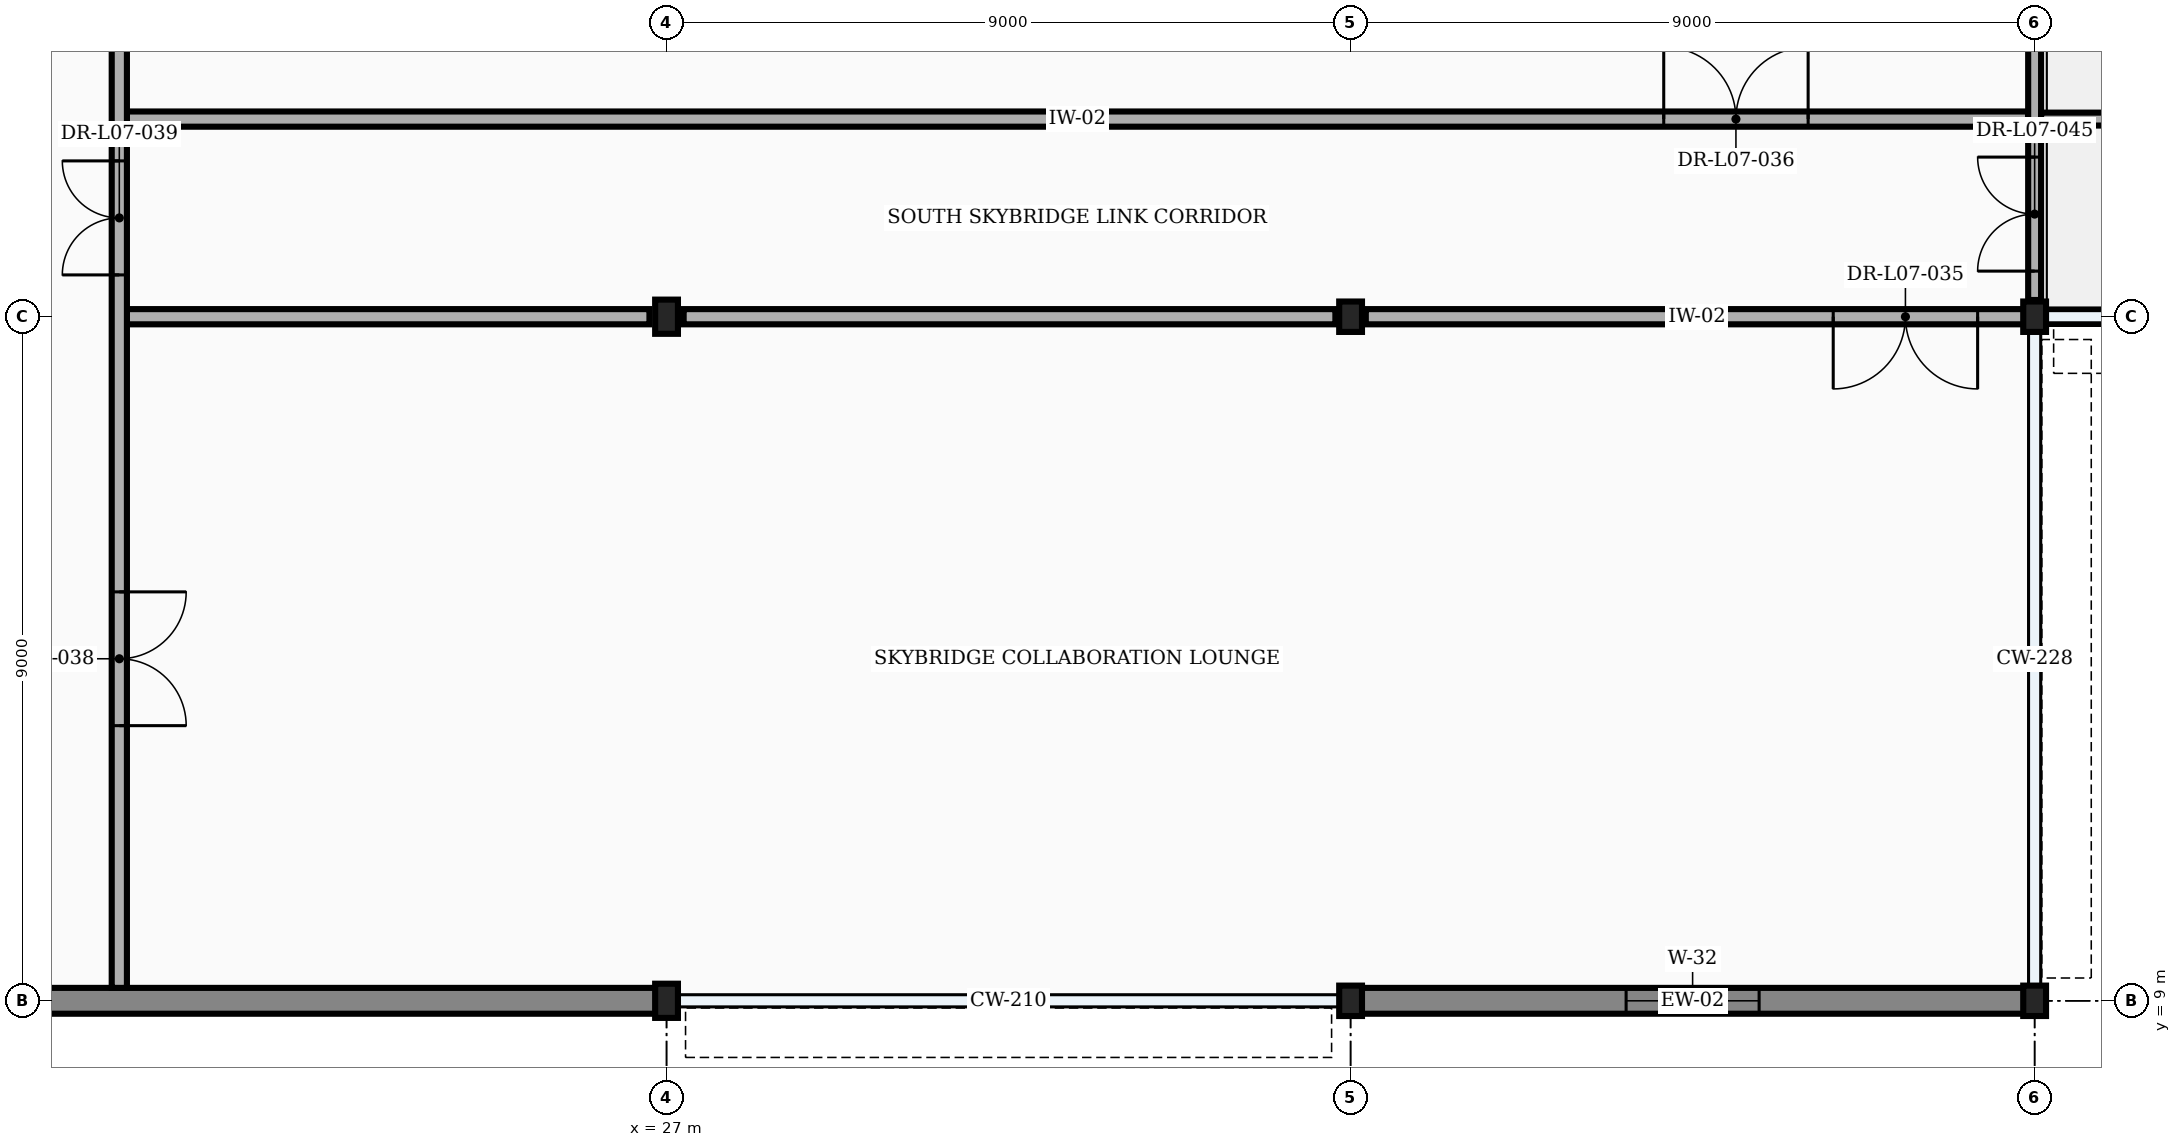
"""IFC4 building model, lengths in metres.
Left out: names, types, materials, properties, quantities, classifications, styles, units other than length and angle.
Written with IfcOpenShell. Run it as: python <this file> out.ifc"""

import sys

from ifc_helpers import new_model, si_unit, direction, frame, frame_2d, origin, origin_2d, place, context, subcontext, project, spatial, rectangle, i_section, extrude, element, fill, save


model = new_model("IFC4")
c1 = context("Model", 3, precision=1e-05, world=origin(), true_north=direction((0.0, 1.0)))
c2 = subcontext(c1, "Body", "Model", "MODEL_VIEW")
j1 = project(units=[si_unit("LENGTHUNIT", "METRE"), si_unit("PLANEANGLEUNIT", "RADIAN")], contexts=[c1])
p1 = place(None, origin())
s1 = spatial("IfcSite", under=j1, at=p1, CompositionType="ELEMENT")
p2 = place(p1, origin())
s2 = spatial("IfcBuilding", under=s1, at=p2, CompositionType="ELEMENT")
p3 = place(p2, frame((0.0, 0.0, 33.3)))
s3 = spatial("IfcBuildingStorey", under=s2, at=p3, CompositionType="ELEMENT", Elevation=33.3)
for number, where, z_axis, x_axis in (
    (1, (27.0, 9.0, 0.0), (0.0, 0.0, 1.0), (1.0, 0.0, 0.0)),
    (2, (27.0, 18.0, 0.0), (0.0, 0.0, 1.0), (1.0, 0.0, 0.0)),
):
    element("IfcColumn", number, at=place(p3, frame(where, z_axis=z_axis, x_axis=x_axis)), inside=s3, PredefinedType="COLUMN", context=c2, shape_type="SweptSolid", body=[
        extrude(i_section(OverallWidth=0.3, OverallDepth=0.45, WebThickness=0.014, FlangeThickness=0.026, FilletRadius=0.027, at=origin_2d()), origin(), (0.0, 0.0, 1.0), 4.5),
    ])
for number, where, z_axis, x_axis in (
    (3, (36.0, 9.0, 0.0), (0.0, 0.0, 1.0), (1.0, 0.0, 0.0)),
    (4, (36.0, 18.0, 0.0), (0.0, 0.0, 1.0), (1.0, 0.0, 0.0)),
    (5, (45.0, 9.0, 0.0), (0.0, 0.0, 1.0), (1.0, 0.0, 0.0)),
    (6, (45.0, 18.0, 0.0), (0.0, 0.0, 1.0), (1.0, 0.0, 0.0)),
):
    element("IfcColumn", number, at=place(p3, frame(where, z_axis=z_axis, x_axis=x_axis)), inside=s3, PredefinedType="COLUMN", context=c2, shape_type="SweptSolid", body=[
        extrude(i_section(OverallWidth=0.3, OverallDepth=0.4, WebThickness=0.013, FlangeThickness=0.024, FilletRadius=0.027, at=origin_2d()), origin(), (0.0, 0.0, 1.0), 4.5),
    ])
p4 = place(p3, frame((9.01, 9.0, 0.0), z_axis=(0.0, 0.0, 1.0), x_axis=(1.0, 0.0, 0.0)))
e7 = element("IfcWall", 7, at=p4, inside=s3, PredefinedType="STANDARD", context=c2, shape_type="SweptSolid", body=[
    extrude(rectangle(XDim=17.98, YDim=0.34, at=frame_2d((8.99, 0.0))), origin(), (0.0, 0.0, 1.0), 3.493),
])
p5 = place(p4, frame((0.65, 0.0, 0.85)))
e8 = element("IfcOpeningElement", 8, at=p5, cuts=e7, PredefinedType="OPENING", context=c2, shape_type="SweptSolid", body=[
    extrude(rectangle(XDim=2.8, YDim=2.25, at=frame_2d((1.4, 1.125))), frame((0.0, 0.182, 0.0), z_axis=(0.0, -1.0, 0.0), x_axis=(1.0, 0.0, 0.0)), (0.0, 0.0, 1.0), 0.364),
])
p6 = place(p3, frame((36.01, 9.0, 0.0), z_axis=(0.0, 0.0, 1.0), x_axis=(1.0, 0.0, 0.0)))
e9 = element("IfcWall", 9, at=p6, inside=s3, PredefinedType="STANDARD", context=c2, shape_type="SweptSolid", body=[
    extrude(rectangle(XDim=8.98, YDim=0.34, at=frame_2d((4.49, 0.0))), origin(), (0.0, 0.0, 1.0), 4.255),
])
p7 = place(p6, frame((3.615, 0.0, 0.85)))
e10 = element("IfcOpeningElement", 10, at=p7, cuts=e9, PredefinedType="OPENING", context=c2, shape_type="SweptSolid", body=[
    extrude(rectangle(XDim=1.75, YDim=1.9, at=frame_2d((0.875, 0.95))), frame((0.0, 0.182, 0.0), z_axis=(0.0, -1.0, 0.0), x_axis=(1.0, 0.0, 0.0)), (0.0, 0.0, 1.0), 0.364),
])
p8 = place(p3, frame((45.0, 18.0, 4.05), z_axis=(0.0, 0.0, 1.0), x_axis=(1.0, 0.0, 0.0)))
e11 = element("IfcWall", 11, at=p8, inside=s3, PredefinedType="PARAPET", context=c2, shape_type="SweptSolid", body=[
    extrude(rectangle(XDim=108.0, YDim=0.19, at=frame_2d((54.0, 0.0))), origin(), (0.0, 0.0, 1.0), 1.2),
])
p9 = place(p3, frame((19.9, 18.0, 0.0), z_axis=(0.0, 0.0, 1.0), x_axis=(1.0, 0.0, 0.0)))
e12 = element("IfcWall", 12, at=p9, inside=s3, PredefinedType="PARTITIONING", context=c2, shape_type="SweptSolid", body=[
    extrude(rectangle(XDim=6.875, YDim=0.2, at=frame_2d((3.438, 0.0))), origin(), (0.0, 0.0, 1.0), 3.493),
])
p10 = place(p3, frame((27.225, 18.0, 0.0), z_axis=(0.0, 0.0, 1.0), x_axis=(1.0, 0.0, 0.0)))
e13 = element("IfcWall", 13, at=p10, inside=s3, PredefinedType="PARTITIONING", context=c2, shape_type="SweptSolid", body=[
    extrude(rectangle(XDim=8.575, YDim=0.2, at=frame_2d((4.288, 0.0))), origin(), (0.0, 0.0, 1.0), 3.755),
])
p11 = place(p3, frame((36.2, 18.0, 0.0), z_axis=(0.0, 0.0, 1.0), x_axis=(1.0, 0.0, 0.0)))
e14 = element("IfcWall", 14, at=p11, inside=s3, PredefinedType="PARTITIONING", context=c2, shape_type="SweptSolid", body=[
    extrude(rectangle(XDim=8.715, YDim=0.2, at=frame_2d((4.357, 0.0))), origin(), (0.0, 0.0, 1.0), 3.725),
])
p12 = place(p11, frame((6.15, 0.0, 0.0)))
e15 = element("IfcOpeningElement", 15, at=p12, cuts=e14, PredefinedType="OPENING", context=c2, shape_type="SweptSolid", body=[
    extrude(rectangle(XDim=1.9, YDim=2.35, at=frame_2d((0.95, 1.175))), frame((0.0, 0.112, 0.0), z_axis=(0.0, -1.0, 0.0), x_axis=(1.0, 0.0, 0.0)), (0.0, 0.0, 1.0), 0.224),
])
p13 = place(p3, frame((19.9, 20.6, 0.0), z_axis=(0.0, 0.0, 1.0), x_axis=(1.0, 0.0, 0.0)))
e16 = element("IfcWall", 16, at=p13, inside=s3, PredefinedType="PARTITIONING", context=c2, shape_type="SweptSolid", body=[
    extrude(rectangle(XDim=25.015, YDim=0.2, at=frame_2d((12.508, 0.0))), origin(), (0.0, 0.0, 1.0), 4.255),
])
p14 = place(p13, frame((20.22, 0.0, 0.0)))
e17 = element("IfcOpeningElement", 17, at=p14, cuts=e16, PredefinedType="OPENING", context=c2, shape_type="SweptSolid", body=[
    extrude(rectangle(XDim=1.9, YDim=2.35, at=frame_2d((0.95, 1.175))), frame((0.0, 0.112, 0.0), z_axis=(0.0, -1.0, 0.0), x_axis=(1.0, 0.0, 0.0)), (0.0, 0.0, 1.0), 0.224),
])
p15 = place(p3, frame((19.8, 9.17, 0.0), z_axis=(0.0, 0.0, 1.0), x_axis=(0.0, 1.0, 0.0)))
e18 = element("IfcWall", 18, at=p15, inside=s3, PredefinedType="PARTITIONING", context=c2, shape_type="SweptSolid", body=[
    extrude(rectangle(XDim=30.07, YDim=0.2, at=frame_2d((15.035, 0.0))), origin(), (0.0, 0.0, 1.0), 4.255),
])
p16 = place(p15, frame((3.45, 0.0, 0.0)))
e19 = element("IfcOpeningElement", 19, at=p16, cuts=e18, PredefinedType="OPENING", context=c2, shape_type="SweptSolid", body=[
    extrude(rectangle(XDim=1.76, YDim=2.35, at=frame_2d((0.88, 1.175))), frame((0.0, 0.112, 0.0), z_axis=(0.0, -1.0, 0.0), x_axis=(1.0, 0.0, 0.0)), (0.0, 0.0, 1.0), 0.224),
])
p17 = place(p15, frame((9.38, 0.0, 0.0)))
e20 = element("IfcOpeningElement", 20, at=p17, cuts=e18, PredefinedType="OPENING", context=c2, shape_type="SweptSolid", body=[
    extrude(rectangle(XDim=1.5, YDim=2.2, at=frame_2d((0.75, 1.1))), frame((0.0, 0.112, 0.0), z_axis=(0.0, -1.0, 0.0), x_axis=(1.0, 0.0, 0.0)), (0.0, 0.0, 1.0), 0.224),
])
p18 = place(p15, frame((27.68, 0.0, 0.0)))
e21 = element("IfcOpeningElement", 21, at=p18, cuts=e18, PredefinedType="OPENING", context=c2, shape_type="SweptSolid", body=[
    extrude(rectangle(XDim=1.9, YDim=2.35, at=frame_2d((0.95, 1.175))), frame((0.0, 0.112, 0.0), z_axis=(0.0, -1.0, 0.0), x_axis=(1.0, 0.0, 0.0)), (0.0, 0.0, 1.0), 0.224),
])
p19 = place(p3, frame((45.0, 18.22, 0.0), z_axis=(0.0, 0.0, 1.0), x_axis=(0.0, 1.0, 0.0)))
e22 = element("IfcWall", 22, at=p19, inside=s3, PredefinedType="PARTITIONING", context=c2, shape_type="SweptSolid", body=[
    extrude(rectangle(XDim=8.56, YDim=0.17, at=frame_2d((4.28, 0.0))), origin(), (0.0, 0.0, 1.0), 3.925),
])
p20 = place(p19, frame((0.38, 0.0, 0.0)))
e23 = element("IfcOpeningElement", 23, at=p20, cuts=e22, PredefinedType="OPENING", context=c2, shape_type="SweptSolid", body=[
    extrude(rectangle(XDim=1.5, YDim=2.2, at=frame_2d((0.75, 1.1))), frame((0.0, 0.097, 0.0), z_axis=(0.0, -1.0, 0.0), x_axis=(1.0, 0.0, 0.0)), (0.0, 0.0, 1.0), 0.194),
])
p21 = place(p3, frame((45.085, 20.6, 0.0), z_axis=(0.0, 0.0, 1.0), x_axis=(1.0, 0.0, 0.0)))
e24 = element("IfcWall", 24, at=p21, inside=s3, PredefinedType="PARTITIONING", context=c2, shape_type="SweptSolid", body=[
    extrude(rectangle(XDim=107.83, YDim=0.17, at=frame_2d((53.915, 0.0))), origin(), (0.0, 0.0, 1.0), 4.255),
])
p22 = place(p21, frame((14.34, 0.0, 0.0)))
e25 = element("IfcOpeningElement", 25, at=p22, cuts=e24, PredefinedType="OPENING", context=c2, shape_type="SweptSolid", body=[
    extrude(rectangle(XDim=1.15, YDim=2.15, at=frame_2d((0.575, 1.075))), frame((0.0, 0.097, 0.0), z_axis=(0.0, -1.0, 0.0), x_axis=(1.0, 0.0, 0.0)), (0.0, 0.0, 1.0), 0.194),
])
p23 = place(p21, frame((104.34, 0.0, 0.0)))
e26 = element("IfcOpeningElement", 26, at=p23, cuts=e24, PredefinedType="OPENING", context=c2, shape_type="SweptSolid", body=[
    extrude(rectangle(XDim=1.15, YDim=2.15, at=frame_2d((0.575, 1.075))), frame((0.0, 0.097, 0.0), z_axis=(0.0, -1.0, 0.0), x_axis=(1.0, 0.0, 0.0)), (0.0, 0.0, 1.0), 0.194),
])
p24 = place(p21, frame((10.85, 0.0, 0.0)))
e27 = element("IfcOpeningElement", 27, at=p24, cuts=e24, PredefinedType="OPENING", context=c2, shape_type="SweptSolid", body=[
    extrude(rectangle(XDim=1.9, YDim=2.35, at=frame_2d((0.95, 1.175))), frame((0.0, 0.097, 0.0), z_axis=(0.0, -1.0, 0.0), x_axis=(1.0, 0.0, 0.0)), (0.0, 0.0, 1.0), 0.194),
])
p25 = place(p21, frame((100.865, 0.0, 0.0)))
e28 = element("IfcOpeningElement", 28, at=p25, cuts=e24, PredefinedType="OPENING", context=c2, shape_type="SweptSolid", body=[
    extrude(rectangle(XDim=1.9, YDim=2.35, at=frame_2d((0.95, 1.175))), frame((0.0, 0.097, 0.0), z_axis=(0.0, -1.0, 0.0), x_axis=(1.0, 0.0, 0.0)), (0.0, 0.0, 1.0), 0.194),
])
p26 = place(p7, origin())
e29 = element("IfcWindow", 29, at=p26, inside=s3, PartitioningType="SINGLE_PANEL", PredefinedType="WINDOW", context=c2, shape_type="SweptSolid", body=[
    extrude(rectangle(XDim=1.75, YDim=1.9, at=frame_2d((0.875, 0.95))), frame((0.0, 0.03, 0.0), z_axis=(0.0, -1.0, 0.0), x_axis=(1.0, 0.0, 0.0)), (0.0, 0.0, 1.0), 0.06),
])
fill(e10, e29)
p27 = place(p12, frame((1.9, 0.0, 0.0), z_axis=(0.0, 0.0, 1.0), x_axis=(-1.0, 0.0, 0.0)))
e30 = element("IfcDoor", 30, at=p27, inside=s3, OperationType="DOUBLE_DOOR_SINGLE_SWING", PredefinedType="DOOR", context=c2, shape_type="SweptSolid", body=[
    extrude(rectangle(XDim=1.9, YDim=2.35, at=frame_2d((0.95, 1.175))), frame((0.0, 0.025, 0.0), z_axis=(0.0, -1.0, 0.0), x_axis=(1.0, 0.0, 0.0)), (0.0, 0.0, 1.0), 0.05),
])
fill(e15, e30)
p28 = place(p14, origin())
e31 = element("IfcDoor", 31, at=p28, inside=s3, OperationType="DOUBLE_DOOR_SINGLE_SWING", PredefinedType="DOOR", context=c2, shape_type="SweptSolid", body=[
    extrude(rectangle(XDim=1.9, YDim=2.35, at=frame_2d((0.95, 1.175))), frame((0.0, 0.025, 0.0), z_axis=(0.0, -1.0, 0.0), x_axis=(1.0, 0.0, 0.0)), (0.0, 0.0, 1.0), 0.05),
])
fill(e17, e31)
p29 = place(p16, frame((1.76, 0.0, 0.0), z_axis=(0.0, 0.0, 1.0), x_axis=(-1.0, 0.0, 0.0)))
e32 = element("IfcDoor", 32, at=p29, inside=s3, OperationType="DOUBLE_DOOR_SINGLE_SWING", PredefinedType="DOOR", context=c2, shape_type="SweptSolid", body=[
    extrude(rectangle(XDim=1.76, YDim=2.35, at=frame_2d((0.88, 1.175))), frame((0.0, 0.025, 0.0), z_axis=(0.0, -1.0, 0.0), x_axis=(1.0, 0.0, 0.0)), (0.0, 0.0, 1.0), 0.05),
])
fill(e19, e32)
p30 = place(p17, origin())
e33 = element("IfcDoor", 33, at=p30, inside=s3, OperationType="DOUBLE_DOOR_SINGLE_SWING", PredefinedType="DOOR", context=c2, shape_type="SweptSolid", body=[
    extrude(rectangle(XDim=1.5, YDim=2.2, at=frame_2d((0.75, 1.1))), frame((0.0, 0.025, 0.0), z_axis=(0.0, -1.0, 0.0), x_axis=(1.0, 0.0, 0.0)), (0.0, 0.0, 1.0), 0.05),
])
fill(e20, e33)
p31 = place(p20, origin())
e34 = element("IfcDoor", 34, at=p31, inside=s3, OperationType="DOUBLE_DOOR_SINGLE_SWING", PredefinedType="DOOR", context=c2, shape_type="SweptSolid", body=[
    extrude(rectangle(XDim=1.5, YDim=2.2, at=frame_2d((0.75, 1.1))), frame((0.0, 0.025, 0.0), z_axis=(0.0, -1.0, 0.0), x_axis=(1.0, 0.0, 0.0)), (0.0, 0.0, 1.0), 0.05),
])
fill(e23, e34)
save(model, sys.argv[1])
